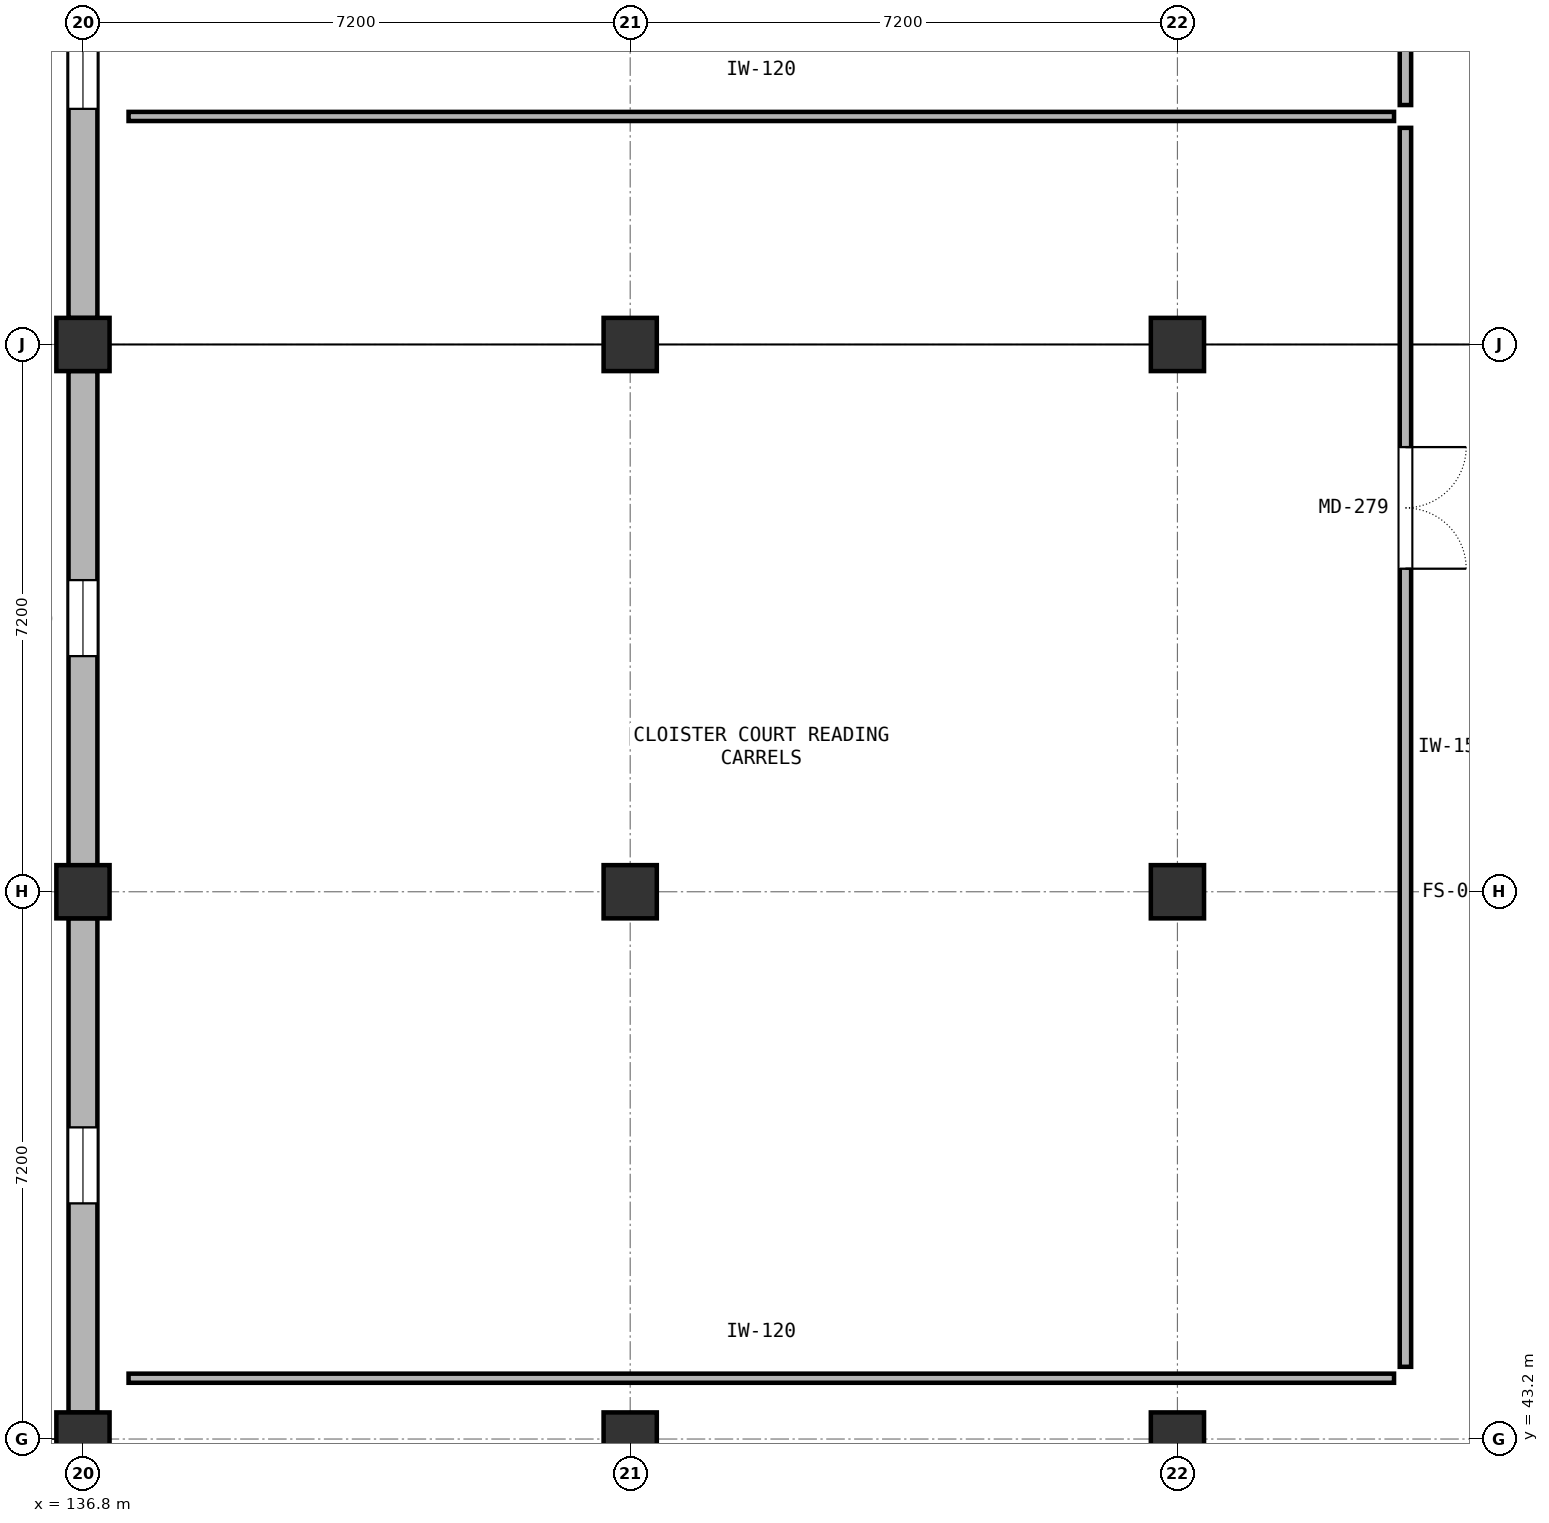
"""IFC4 building model, lengths in metres.
Left out: names, types, materials, properties, quantities, classifications, styles, units other than length and angle.
Written with IfcOpenShell. Run it as: python <this file> out.ifc"""

import sys

from ifc_helpers import new_model, si_unit, direction, frame, frame_2d, origin, origin_2d, place, context, subcontext, project, spatial, rectangle, extrude, element, fill, save


model = new_model("IFC4")
c1 = context("Model", 3, precision=1e-05, world=origin(), true_north=direction((0.0, 1.0)))
c2 = subcontext(c1, "Body", "Model", "MODEL_VIEW")
j1 = project(units=[si_unit("LENGTHUNIT", "METRE"), si_unit("PLANEANGLEUNIT", "RADIAN")], contexts=[c1])
p1 = place(None, origin())
s1 = spatial("IfcSite", under=j1, at=p1, CompositionType="ELEMENT")
p2 = place(p1, origin())
s2 = spatial("IfcBuilding", under=s1, at=p2, CompositionType="ELEMENT")
p3 = place(p2, frame((0.0, 0.0, 5.4)))
s3 = spatial("IfcBuildingStorey", under=s2, at=p3, CompositionType="ELEMENT", Elevation=5.4)
for number, where, z_axis, x_axis in (
    (1, (136.8, 43.2, 0.0), (0.0, 0.0, 1.0), (1.0, 0.0, 0.0)),
    (2, (136.8, 50.4, 0.0), (0.0, 0.0, 1.0), (1.0, 0.0, 0.0)),
    (3, (136.8, 57.6, 0.0), (0.0, 0.0, 1.0), (1.0, 0.0, 0.0)),
    (4, (144.0, 43.2, 0.0), (0.0, 0.0, 1.0), (1.0, 0.0, 0.0)),
    (5, (144.0, 50.4, 0.0), (0.0, 0.0, 1.0), (1.0, 0.0, 0.0)),
    (6, (144.0, 57.6, 0.0), (0.0, 0.0, 1.0), (1.0, 0.0, 0.0)),
    (7, (151.2, 43.2, 0.0), (0.0, 0.0, 1.0), (1.0, 0.0, 0.0)),
    (8, (151.2, 50.4, 0.0), (0.0, 0.0, 1.0), (1.0, 0.0, 0.0)),
    (9, (151.2, 57.6, 0.0), (0.0, 0.0, 1.0), (1.0, 0.0, 0.0)),
):
    element("IfcColumn", number, at=place(p3, frame(where, z_axis=z_axis, x_axis=x_axis)), inside=s3, PredefinedType="COLUMN", context=c2, shape_type="SweptSolid", body=[
        extrude(rectangle(XDim=0.7, YDim=0.7, at=origin_2d()), origin(), (0.0, 0.0, 1.0), 4.8),
    ])
p4 = place(p3, frame((136.8, 43.548, 0.0), z_axis=(0.0, 0.0, 1.0), x_axis=(0.0, 1.0, 0.0)))
e10 = element("IfcWall", 10, at=p4, inside=s3, PredefinedType="SOLIDWALL", context=c2, shape_type="SweptSolid", body=[
    extrude(rectangle(XDim=6.504, YDim=0.38, at=frame_2d((3.252, 0.0))), origin(), (0.0, 0.0, 1.0), 3.5),
])
p5 = place(p4, frame((2.752, 0.0, 0.7)))
e11 = element("IfcOpeningElement", 11, at=p5, cuts=e10, PredefinedType="OPENING", context=c2, shape_type="SweptSolid", body=[
    extrude(rectangle(XDim=1.0, YDim=2.0, at=frame_2d((0.5, 1.0))), frame((0.0, 0.2, 0.0), z_axis=(0.0, -1.0, 0.0), x_axis=(1.0, 0.0, 0.0)), (0.0, 0.0, 1.0), 0.4),
])
p6 = place(p3, frame((136.8, 50.748, 0.0), z_axis=(0.0, 0.0, 1.0), x_axis=(0.0, 1.0, 0.0)))
e12 = element("IfcWall", 12, at=p6, inside=s3, PredefinedType="SOLIDWALL", context=c2, shape_type="SweptSolid", body=[
    extrude(rectangle(XDim=6.504, YDim=0.38, at=frame_2d((3.252, 0.0))), origin(), (0.0, 0.0, 1.0), 3.5),
])
p7 = place(p6, frame((2.752, 0.0, 0.7)))
e13 = element("IfcOpeningElement", 13, at=p7, cuts=e12, PredefinedType="OPENING", context=c2, shape_type="SweptSolid", body=[
    extrude(rectangle(XDim=1.0, YDim=2.0, at=frame_2d((0.5, 1.0))), frame((0.0, 0.2, 0.0), z_axis=(0.0, -1.0, 0.0), x_axis=(1.0, 0.0, 0.0)), (0.0, 0.0, 1.0), 0.4),
])
p8 = place(p3, frame((136.8, 57.948, 0.0), z_axis=(0.0, 0.0, 1.0), x_axis=(0.0, 1.0, 0.0)))
e14 = element("IfcWall", 14, at=p8, inside=s3, PredefinedType="SOLIDWALL", context=c2, shape_type="SweptSolid", body=[
    extrude(rectangle(XDim=6.504, YDim=0.38, at=frame_2d((3.252, 0.0))), origin(), (0.0, 0.0, 1.0), 3.5),
])
p9 = place(p8, frame((2.752, 0.0, 0.7)))
e15 = element("IfcOpeningElement", 15, at=p9, cuts=e14, PredefinedType="OPENING", context=c2, shape_type="SweptSolid", body=[
    extrude(rectangle(XDim=1.0, YDim=2.0, at=frame_2d((0.5, 1.0))), frame((0.0, 0.2, 0.0), z_axis=(0.0, -1.0, 0.0), x_axis=(1.0, 0.0, 0.0)), (0.0, 0.0, 1.0), 0.4),
])
p10 = place(p3, frame((154.2, 60.45, 0.0), z_axis=(0.0, 0.0, 1.0), x_axis=(0.0, -1.0, 0.0)))
e16 = element("IfcWall", 16, at=p10, inside=s3, PredefinedType="PARTITIONING", context=c2, shape_type="SweptSolid", body=[
    extrude(rectangle(XDim=16.3, YDim=0.15, at=frame_2d((8.15, 0.0))), origin(), (0.0, 0.0, 1.0), 3.52),
])
p11 = place(p10, frame((4.2, 0.0, 0.0)))
e17 = element("IfcOpeningElement", 17, at=p11, cuts=e16, PredefinedType="OPENING", context=c2, shape_type="SweptSolid", body=[
    extrude(rectangle(XDim=1.6, YDim=2.2, at=frame_2d((0.8, 1.1))), frame((0.0, 0.085, 0.0), z_axis=(0.0, -1.0, 0.0), x_axis=(1.0, 0.0, 0.0)), (0.0, 0.0, 1.0), 0.17),
])
p12 = place(p3, frame((137.4, 44.0, 0.0), z_axis=(0.0, 0.0, 1.0), x_axis=(1.0, 0.0, 0.0)))
e18 = element("IfcWall", 18, at=p12, inside=s3, PredefinedType="PARTITIONING", context=c2, shape_type="SweptSolid", body=[
    extrude(rectangle(XDim=16.65, YDim=0.12, at=frame_2d((8.325, 0.0))), origin(), (0.0, 0.0, 1.0), 3.52),
])
p13 = place(p3, frame((154.2, 78.25, 0.0), z_axis=(0.0, 0.0, 1.0), x_axis=(0.0, -1.0, 0.0)))
e19 = element("IfcWall", 19, at=p13, inside=s3, PredefinedType="PARTITIONING", context=c2, shape_type="SweptSolid", body=[
    extrude(rectangle(XDim=17.5, YDim=0.15, at=frame_2d((8.75, 0.0))), origin(), (0.0, 0.0, 1.0), 3.52),
])
p14 = place(p13, frame((4.2, 0.0, 0.0)))
e20 = element("IfcOpeningElement", 20, at=p14, cuts=e19, PredefinedType="OPENING", context=c2, shape_type="SweptSolid", body=[
    extrude(rectangle(XDim=1.6, YDim=2.2, at=frame_2d((0.8, 1.1))), frame((0.0, 0.085, 0.0), z_axis=(0.0, -1.0, 0.0), x_axis=(1.0, 0.0, 0.0)), (0.0, 0.0, 1.0), 0.17),
])
p15 = place(p3, frame((137.4, 60.6, 0.0), z_axis=(0.0, 0.0, 1.0), x_axis=(1.0, 0.0, 0.0)))
e21 = element("IfcWall", 21, at=p15, inside=s3, PredefinedType="PARTITIONING", context=c2, shape_type="SweptSolid", body=[
    extrude(rectangle(XDim=16.65, YDim=0.12, at=frame_2d((8.325, 0.0))), origin(), (0.0, 0.0, 1.0), 3.52),
])
p16 = place(p5, origin())
e22 = element("IfcWindow", 22, at=p16, inside=s3, PartitioningType="SINGLE_PANEL", PredefinedType="WINDOW", context=c2, shape_type="SweptSolid", body=[
    extrude(rectangle(XDim=1.0, YDim=2.0, at=frame_2d((0.5, 1.0))), frame((0.0, 0.03, 0.0), z_axis=(0.0, -1.0, 0.0), x_axis=(1.0, 0.0, 0.0)), (0.0, 0.0, 1.0), 0.06),
])
fill(e11, e22)
p17 = place(p7, origin())
e23 = element("IfcWindow", 23, at=p17, inside=s3, PartitioningType="SINGLE_PANEL", PredefinedType="WINDOW", context=c2, shape_type="SweptSolid", body=[
    extrude(rectangle(XDim=1.0, YDim=2.0, at=frame_2d((0.5, 1.0))), frame((0.0, 0.03, 0.0), z_axis=(0.0, -1.0, 0.0), x_axis=(1.0, 0.0, 0.0)), (0.0, 0.0, 1.0), 0.06),
])
fill(e13, e23)
p18 = place(p9, origin())
e24 = element("IfcWindow", 24, at=p18, inside=s3, PartitioningType="SINGLE_PANEL", PredefinedType="WINDOW", context=c2, shape_type="SweptSolid", body=[
    extrude(rectangle(XDim=1.0, YDim=2.0, at=frame_2d((0.5, 1.0))), frame((0.0, 0.03, 0.0), z_axis=(0.0, -1.0, 0.0), x_axis=(1.0, 0.0, 0.0)), (0.0, 0.0, 1.0), 0.06),
])
fill(e15, e24)
p19 = place(p11, origin())
e25 = element("IfcDoor", 25, at=p19, inside=s3, OperationType="DOUBLE_DOOR_SINGLE_SWING", PredefinedType="DOOR", context=c2, shape_type="SweptSolid", body=[
    extrude(rectangle(XDim=1.6, YDim=2.2, at=frame_2d((0.8, 1.1))), frame((0.0, 0.025, 0.0), z_axis=(0.0, -1.0, 0.0), x_axis=(1.0, 0.0, 0.0)), (0.0, 0.0, 1.0), 0.05),
])
fill(e17, e25)
save(model, sys.argv[1])
